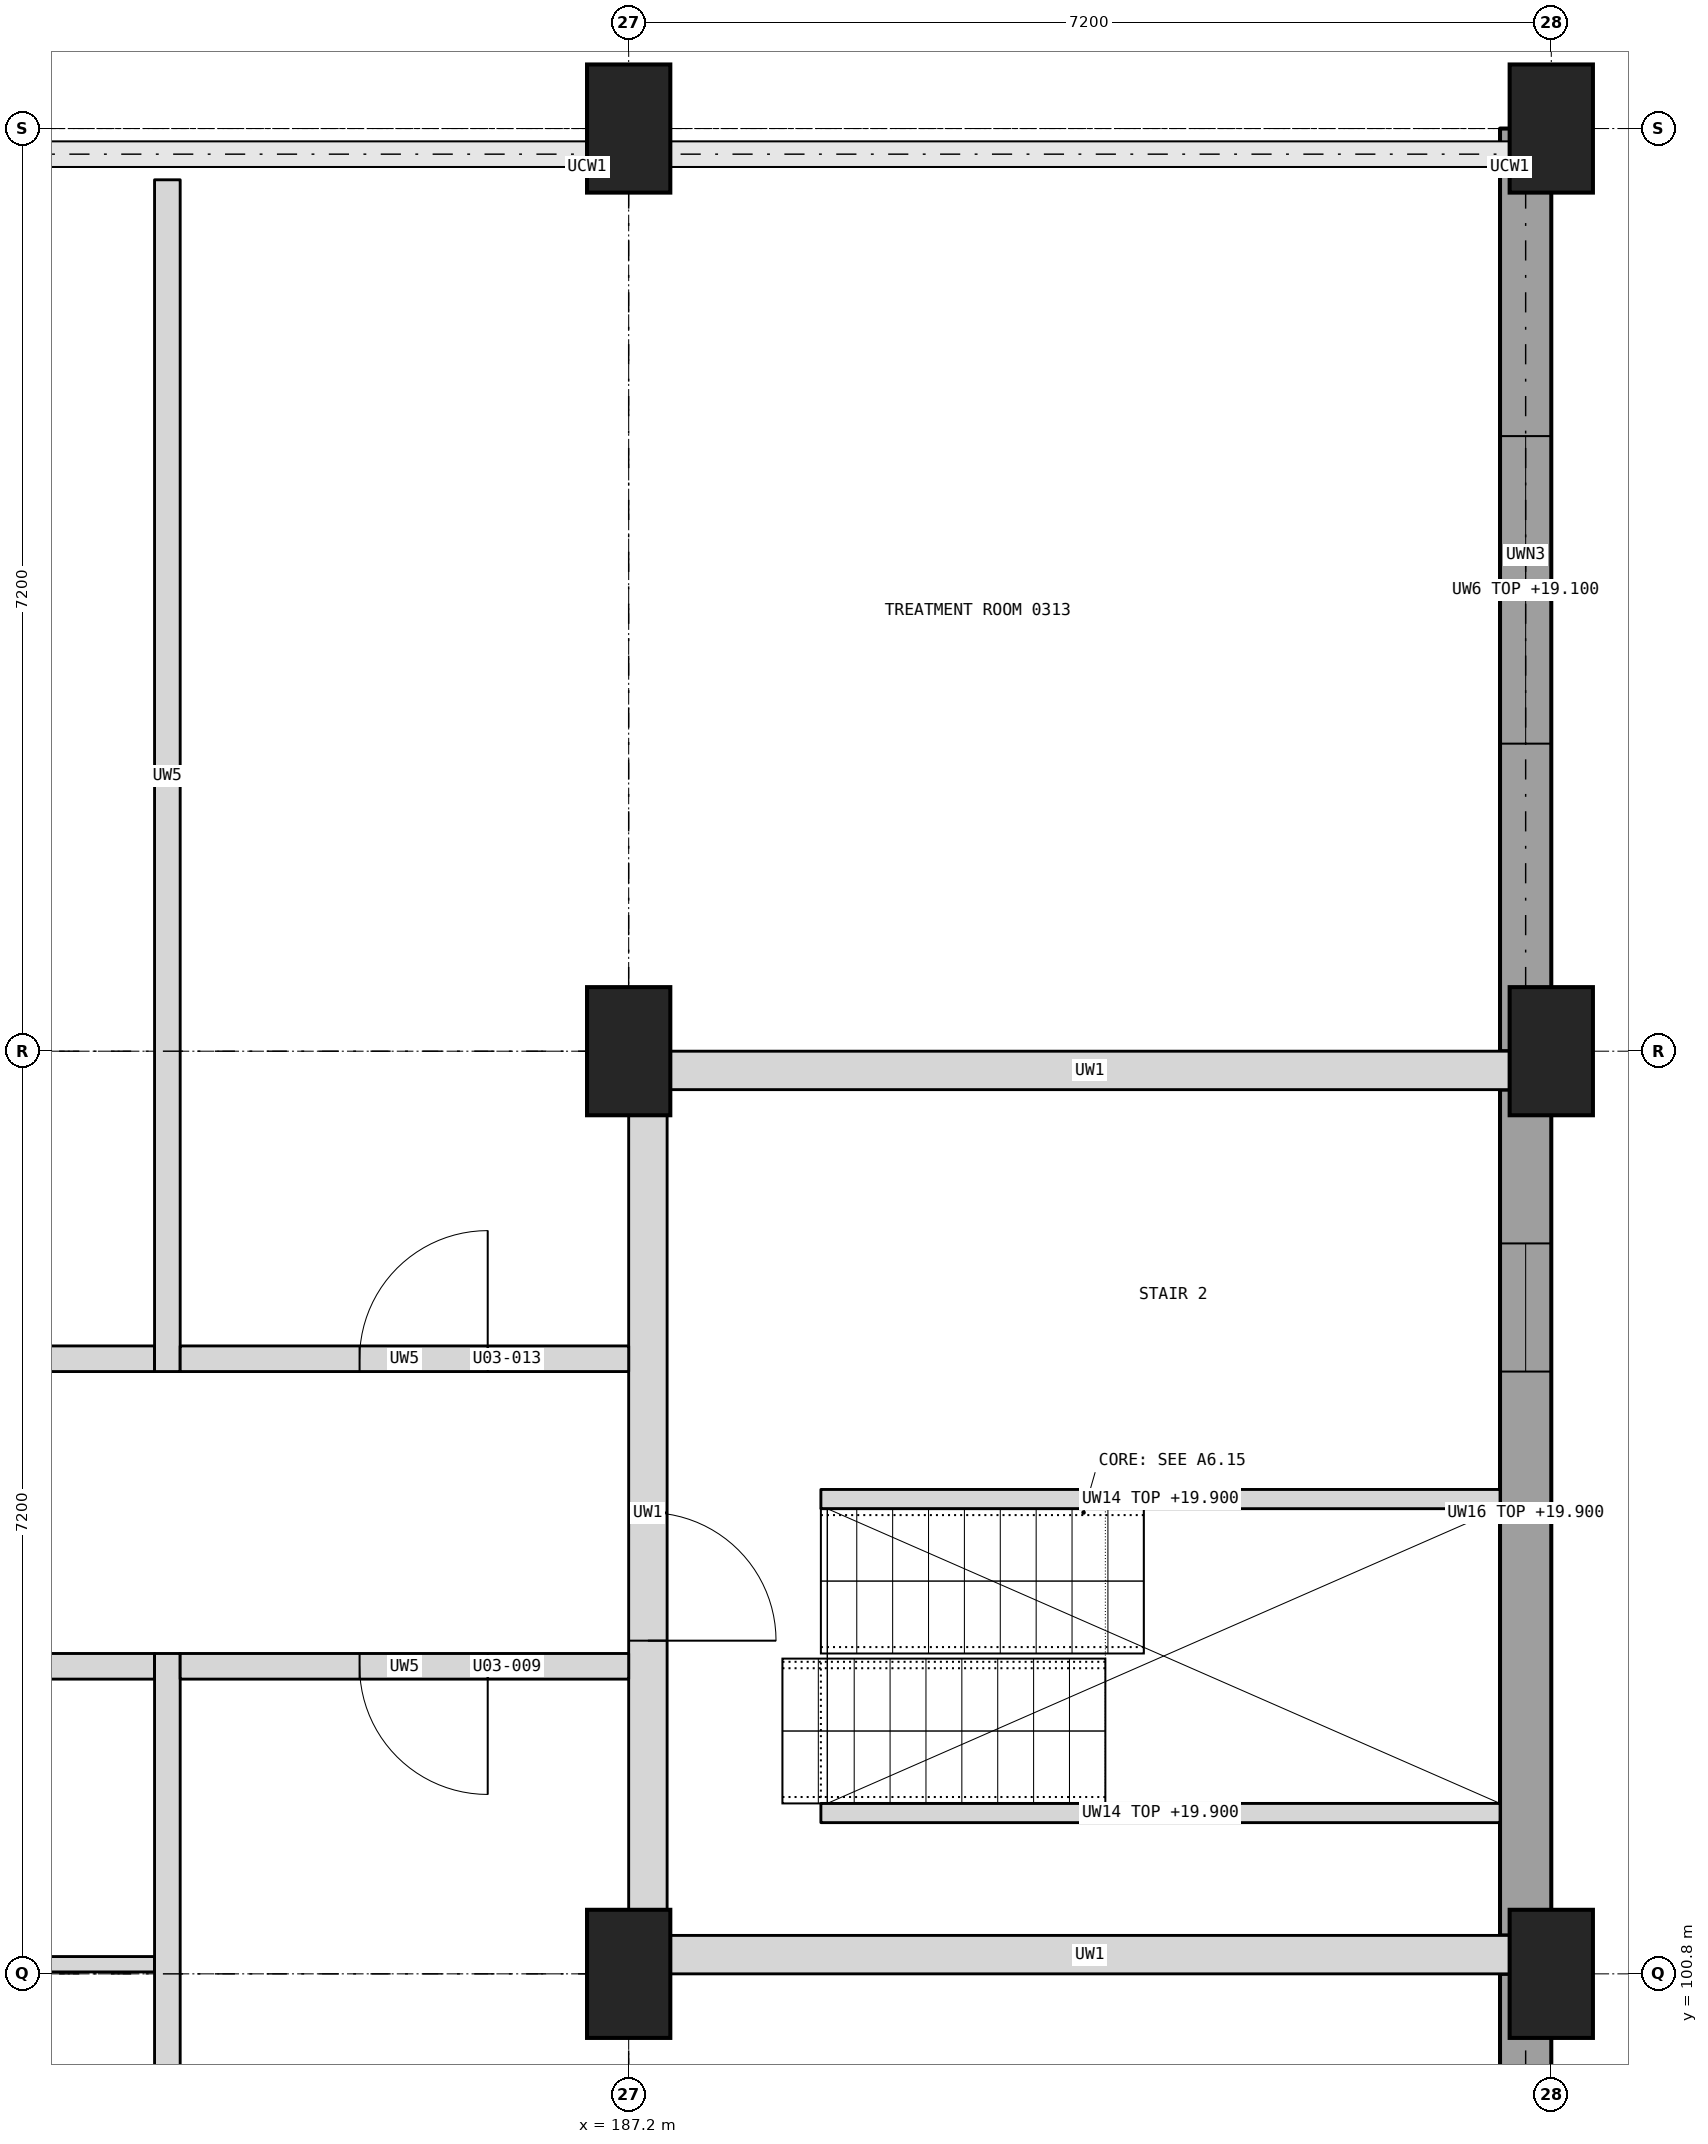
"""IFC4 building model, lengths in metres.
Left out: names, types, materials, properties, quantities, classifications, styles, units other than length and angle.
Written with IfcOpenShell. Run it as: python <this file> out.ifc"""

import sys

from ifc_helpers import new_model, si_unit, direction, frame, frame_2d, origin, origin_2d, place, context, subcontext, project, spatial, rectangle, extrude, element, fill, save


model = new_model("IFC4")
c1 = context("Model", 3, precision=1e-05, world=origin(), true_north=direction((0.0, 1.0)))
c2 = subcontext(c1, "Body", "Model", "MODEL_VIEW")
j1 = project(units=[si_unit("LENGTHUNIT", "METRE"), si_unit("PLANEANGLEUNIT", "RADIAN")], contexts=[c1])
p1 = place(None, origin())
s1 = spatial("IfcSite", under=j1, at=p1, CompositionType="ELEMENT")
p2 = place(p1, origin())
s2 = spatial("IfcBuilding", under=s1, at=p2, CompositionType="ELEMENT")
p3 = place(p2, frame((0.0, 0.0, 16.5)))
s3 = spatial("IfcBuildingStorey", under=s2, at=p3, CompositionType="ELEMENT", Elevation=16.5)
for number, where, z_axis, x_axis in (
    (1, (187.2, 100.8, 0.0), (0.0, 0.0, 1.0), (1.0, 0.0, 0.0)),
    (2, (187.2, 108.0, 0.0), (0.0, 0.0, 1.0), (1.0, 0.0, 0.0)),
    (3, (187.2, 115.2, 0.0), (0.0, 0.0, 1.0), (1.0, 0.0, 0.0)),
    (4, (194.4, 100.8, 0.0), (0.0, 0.0, 1.0), (1.0, 0.0, 0.0)),
    (5, (194.4, 108.0, 0.0), (0.0, 0.0, 1.0), (1.0, 0.0, 0.0)),
    (6, (194.4, 115.2, 0.0), (0.0, 0.0, 1.0), (1.0, 0.0, 0.0)),
):
    element("IfcColumn", number, at=place(p3, frame(where, z_axis=z_axis, x_axis=x_axis)), inside=s3, PredefinedType="COLUMN", context=c2, shape_type="SweptSolid", body=[
        extrude(rectangle(XDim=0.65, YDim=1.0, at=origin_2d()), origin(), (0.0, 0.0, 1.0), 3.4),
    ])
for number, where, z_axis, x_axis in (
    (7, (194.4, 100.95, 0.0), (0.0, 0.0, 1.0), (-1.0, 0.0, 0.0)),
    (8, (194.4, 107.85, 0.0), (0.0, 0.0, 1.0), (-1.0, 0.0, 0.0)),
):
    element("IfcWall", number, at=place(p3, frame(where, z_axis=z_axis, x_axis=x_axis)), inside=s3, PredefinedType="SHEAR", context=c2, shape_type="SweptSolid", body=[
        extrude(rectangle(XDim=7.2, YDim=0.3, at=frame_2d((3.6, 0.0))), origin(), (0.0, 0.0, 1.0), 3.4),
    ])
p4 = place(p3, frame((187.35, 101.1, 0.0), z_axis=(0.0, 0.0, 1.0), x_axis=(0.0, 1.0, 0.0)))
e9 = element("IfcWall", 9, at=p4, inside=s3, PredefinedType="SHEAR", context=c2, shape_type="SweptSolid", body=[
    extrude(rectangle(XDim=6.6, YDim=0.3, at=frame_2d((3.3, 0.0))), origin(), (0.0, 0.0, 1.0), 3.4),
])
p5 = place(p4, frame((2.3, 0.0, 0.0)))
e10 = element("IfcOpeningElement", 10, at=p5, cuts=e9, PredefinedType="OPENING", context=c2, shape_type="SweptSolid", body=[
    extrude(rectangle(XDim=1.0, YDim=2.1, at=frame_2d((0.5, 1.05))), frame((0.0, 0.16, 0.0), z_axis=(0.0, -1.0, 0.0), x_axis=(1.0, 0.0, 0.0)), (0.0, 0.0, 1.0), 0.32),
])
p6 = place(p3, frame((194.2, 101.1, 0.0), z_axis=(0.0, 0.0, 1.0), x_axis=(0.0, 1.0, 0.0)))
e11 = element("IfcWall", 11, at=p6, inside=s3, PredefinedType="SHEAR", context=c2, shape_type="SweptSolid", body=[
    extrude(rectangle(XDim=6.6, YDim=0.4, at=frame_2d((3.3, 0.0))), origin(), (0.0, 0.0, 1.0), 3.4),
])
p7 = place(p6, frame((4.4, 0.0, 1.0)))
e12 = element("IfcOpeningElement", 12, at=p7, cuts=e11, PredefinedType="OPENING", context=c2, shape_type="SweptSolid", body=[
    extrude(rectangle(XDim=1.0, YDim=1.5, at=frame_2d((0.5, 0.75))), frame((0.0, 0.21, 0.0), z_axis=(0.0, -1.0, 0.0), x_axis=(1.0, 0.0, 0.0)), (0.0, 0.0, 1.0), 0.42),
])
for number, where, z_axis, x_axis in (
    (13, (188.7, 102.055, 0.0), (0.0, 0.0, 1.0), (1.0, 0.0, 0.0)),
    (14, (188.7, 104.505, 0.0), (0.0, 0.0, 1.0), (1.0, 0.0, 0.0)),
):
    element("IfcWall", number, at=place(p3, frame(where, z_axis=z_axis, x_axis=x_axis)), inside=s3, PredefinedType="SHEAR", context=c2, shape_type="SweptSolid", body=[
        extrude(rectangle(XDim=5.3, YDim=0.15, at=frame_2d((2.65, 0.0))), origin(), (0.0, 0.0, 1.0), 3.4),
    ])
p8 = place(p3, frame((194.2, 93.6, 0.0), z_axis=(0.0, 0.0, 1.0), x_axis=(0.0, 1.0, 0.0)))
e15 = element("IfcWall", 15, at=p8, inside=s3, PredefinedType="SOLIDWALL", context=c2, shape_type="SweptSolid", body=[
    extrude(rectangle(XDim=7.2, YDim=0.4, at=frame_2d((3.6, 0.0))), origin(), (0.0, 0.0, 1.0), 2.6),
])
p9 = place(p8, frame((2.4, 0.0, 0.9)))
e16 = element("IfcOpeningElement", 16, at=p9, cuts=e15, PredefinedType="OPENING", context=c2, shape_type="SweptSolid", body=[
    extrude(rectangle(XDim=2.4, YDim=1.5, at=frame_2d((1.2, 0.75))), frame((0.0, 0.21, 0.0), z_axis=(0.0, -1.0, 0.0), x_axis=(1.0, 0.0, 0.0)), (0.0, 0.0, 1.0), 0.42),
])
p10 = place(p3, frame((194.2, 108.0, 0.0), z_axis=(0.0, 0.0, 1.0), x_axis=(0.0, 1.0, 0.0)))
e17 = element("IfcWall", 17, at=p10, inside=s3, PredefinedType="SOLIDWALL", context=c2, shape_type="SweptSolid", body=[
    extrude(rectangle(XDim=7.2, YDim=0.4, at=frame_2d((3.6, 0.0))), origin(), (0.0, 0.0, 1.0), 2.6),
])
p11 = place(p10, frame((2.4, 0.0, 0.9)))
e18 = element("IfcOpeningElement", 18, at=p11, cuts=e17, PredefinedType="OPENING", context=c2, shape_type="SweptSolid", body=[
    extrude(rectangle(XDim=2.4, YDim=1.5, at=frame_2d((1.2, 0.75))), frame((0.0, 0.21, 0.0), z_axis=(0.0, -1.0, 0.0), x_axis=(1.0, 0.0, 0.0)), (0.0, 0.0, 1.0), 0.42),
])
p12 = place(p3, frame((180.275, 100.875, 0.0), z_axis=(0.0, 0.0, 1.0), x_axis=(1.0, 0.0, 0.0)))
e19 = element("IfcWall", 19, at=p12, inside=s3, PredefinedType="PARTITIONING", context=c2, shape_type="SweptSolid", body=[
    extrude(rectangle(XDim=3.225, YDim=0.12, at=frame_2d((1.613, 0.0))), origin(), (0.0, 0.0, 1.0), 2.5),
])
p13 = place(p12, frame((1.15, 0.0, 0.0)))
e20 = element("IfcOpeningElement", 20, at=p13, cuts=e19, PredefinedType="OPENING", context=c2, shape_type="SweptSolid", body=[
    extrude(rectangle(XDim=0.75, YDim=2.1, at=frame_2d((0.375, 1.05))), frame((0.0, 0.07, 0.0), z_axis=(0.0, -1.0, 0.0), x_axis=(1.0, 0.0, 0.0)), (0.0, 0.0, 1.0), 0.14),
])
p14 = place(p3, frame((180.1, 103.2, 0.0), z_axis=(0.0, 0.0, 1.0), x_axis=(1.0, 0.0, 0.0)))
e21 = element("IfcWall", 21, at=p14, inside=s3, PredefinedType="PARTITIONING", context=c2, shape_type="SweptSolid", body=[
    extrude(rectangle(XDim=3.4, YDim=0.2, at=frame_2d((1.7, 0.0))), origin(), (0.0, 0.0, 1.0), 3.1),
])
p15 = place(p14, frame((1.25, 0.0, 0.0)))
e22 = element("IfcOpeningElement", 22, at=p15, cuts=e21, PredefinedType="OPENING", context=c2, shape_type="SweptSolid", body=[
    extrude(rectangle(XDim=0.9, YDim=2.1, at=frame_2d((0.45, 1.05))), frame((0.0, 0.11, 0.0), z_axis=(0.0, -1.0, 0.0), x_axis=(1.0, 0.0, 0.0)), (0.0, 0.0, 1.0), 0.22),
])
p16 = place(p3, frame((183.6, 94.0, 0.0), z_axis=(0.0, 0.0, 1.0), x_axis=(0.0, 1.0, 0.0)))
e23 = element("IfcWall", 23, at=p16, inside=s3, PredefinedType="PARTITIONING", context=c2, shape_type="SweptSolid", body=[
    extrude(rectangle(XDim=9.3, YDim=0.2, at=frame_2d((4.65, 0.0))), origin(), (0.0, 0.0, 1.0), 3.1),
])
p17 = place(p3, frame((183.7, 103.2, 0.0), z_axis=(0.0, 0.0, 1.0), x_axis=(1.0, 0.0, 0.0)))
e24 = element("IfcWall", 24, at=p17, inside=s3, PredefinedType="PARTITIONING", context=c2, shape_type="SweptSolid", body=[
    extrude(rectangle(XDim=3.5, YDim=0.2, at=frame_2d((1.75, 0.0))), origin(), (0.0, 0.0, 1.0), 3.1),
])
p18 = place(p17, frame((1.4, 0.0, 0.0)))
e25 = element("IfcOpeningElement", 25, at=p18, cuts=e24, PredefinedType="OPENING", context=c2, shape_type="SweptSolid", body=[
    extrude(rectangle(XDim=1.0, YDim=2.1, at=frame_2d((0.5, 1.05))), frame((0.0, 0.11, 0.0), z_axis=(0.0, -1.0, 0.0), x_axis=(1.0, 0.0, 0.0)), (0.0, 0.0, 1.0), 0.22),
])
p19 = place(p3, frame((176.5, 105.6, 0.0), z_axis=(0.0, 0.0, 1.0), x_axis=(1.0, 0.0, 0.0)))
e26 = element("IfcWall", 26, at=p19, inside=s3, PredefinedType="PARTITIONING", context=c2, shape_type="SweptSolid", body=[
    extrude(rectangle(XDim=7.0, YDim=0.2, at=frame_2d((3.5, 0.0))), origin(), (0.0, 0.0, 1.0), 3.1),
])
p20 = place(p19, frame((1.4, 0.0, 0.0)))
e27 = element("IfcOpeningElement", 27, at=p20, cuts=e26, PredefinedType="OPENING", context=c2, shape_type="SweptSolid", body=[
    extrude(rectangle(XDim=1.0, YDim=2.1, at=frame_2d((0.5, 1.05))), frame((0.0, 0.11, 0.0), z_axis=(0.0, -1.0, 0.0), x_axis=(1.0, 0.0, 0.0)), (0.0, 0.0, 1.0), 0.22),
])
p21 = place(p3, frame((183.6, 105.5, 0.0), z_axis=(0.0, 0.0, 1.0), x_axis=(0.0, 1.0, 0.0)))
e28 = element("IfcWall", 28, at=p21, inside=s3, PredefinedType="PARTITIONING", context=c2, shape_type="SweptSolid", body=[
    extrude(rectangle(XDim=9.3, YDim=0.2, at=frame_2d((4.65, 0.0))), origin(), (0.0, 0.0, 1.0), 3.1),
])
p22 = place(p3, frame((183.7, 105.6, 0.0), z_axis=(0.0, 0.0, 1.0), x_axis=(1.0, 0.0, 0.0)))
e29 = element("IfcWall", 29, at=p22, inside=s3, PredefinedType="PARTITIONING", context=c2, shape_type="SweptSolid", body=[
    extrude(rectangle(XDim=3.5, YDim=0.2, at=frame_2d((1.75, 0.0))), origin(), (0.0, 0.0, 1.0), 3.1),
])
p23 = place(p22, frame((1.4, 0.0, 0.0)))
e30 = element("IfcOpeningElement", 30, at=p23, cuts=e29, PredefinedType="OPENING", context=c2, shape_type="SweptSolid", body=[
    extrude(rectangle(XDim=1.0, YDim=2.1, at=frame_2d((0.5, 1.05))), frame((0.0, 0.11, 0.0), z_axis=(0.0, -1.0, 0.0), x_axis=(1.0, 0.0, 0.0)), (0.0, 0.0, 1.0), 0.22),
])
p24 = place(p11, origin())
e31 = element("IfcWindow", 31, at=p24, inside=s3, PartitioningType="DOUBLE_PANEL_VERTICAL", PredefinedType="WINDOW", context=c2, shape_type="SweptSolid", body=[
    extrude(rectangle(XDim=2.4, YDim=1.5, at=frame_2d((1.2, 0.75))), frame((0.0, 0.03, 0.0), z_axis=(0.0, -1.0, 0.0), x_axis=(1.0, 0.0, 0.0)), (0.0, 0.0, 1.0), 0.06),
])
fill(e18, e31)
p25 = place(p7, origin())
e32 = element("IfcWindow", 32, at=p25, inside=s3, PartitioningType="SINGLE_PANEL", PredefinedType="WINDOW", context=c2, shape_type="SweptSolid", body=[
    extrude(rectangle(XDim=1.0, YDim=1.5, at=frame_2d((0.5, 0.75))), frame((0.0, 0.03, 0.0), z_axis=(0.0, -1.0, 0.0), x_axis=(1.0, 0.0, 0.0)), (0.0, 0.0, 1.0), 0.06),
])
fill(e12, e32)
p26 = place(p18, frame((1.0, 0.0, 0.0), z_axis=(0.0, 0.0, 1.0), x_axis=(-1.0, 0.0, 0.0)))
e33 = element("IfcDoor", 33, at=p26, inside=s3, OperationType="SINGLE_SWING_LEFT", PredefinedType="DOOR", context=c2, shape_type="SweptSolid", body=[
    extrude(rectangle(XDim=1.0, YDim=2.1, at=frame_2d((0.5, 1.05))), frame((0.0, 0.025, 0.0), z_axis=(0.0, -1.0, 0.0), x_axis=(1.0, 0.0, 0.0)), (0.0, 0.0, 1.0), 0.05),
])
fill(e25, e33)
p27 = place(p23, origin())
e34 = element("IfcDoor", 34, at=p27, inside=s3, OperationType="SINGLE_SWING_RIGHT", PredefinedType="DOOR", context=c2, shape_type="SweptSolid", body=[
    extrude(rectangle(XDim=1.0, YDim=2.1, at=frame_2d((0.5, 1.05))), frame((0.0, 0.025, 0.0), z_axis=(0.0, -1.0, 0.0), x_axis=(1.0, 0.0, 0.0)), (0.0, 0.0, 1.0), 0.05),
])
fill(e30, e34)
p28 = place(p5, frame((1.0, 0.0, 0.0), z_axis=(0.0, 0.0, 1.0), x_axis=(-1.0, 0.0, 0.0)))
e35 = element("IfcDoor", 35, at=p28, inside=s3, OperationType="SINGLE_SWING_RIGHT", PredefinedType="DOOR", context=c2, shape_type="SweptSolid", body=[
    extrude(rectangle(XDim=1.0, YDim=2.1, at=frame_2d((0.5, 1.05))), frame((0.0, 0.025, 0.0), z_axis=(0.0, -1.0, 0.0), x_axis=(1.0, 0.0, 0.0)), (0.0, 0.0, 1.0), 0.05),
])
fill(e10, e35)
save(model, sys.argv[1])
